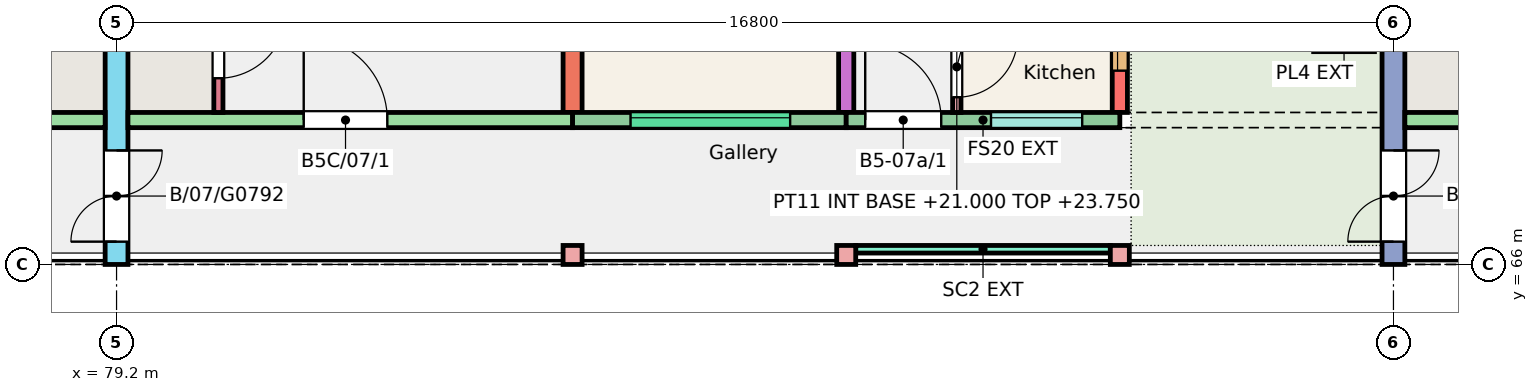
"""IFC4 building model, lengths in metres.
Left out: names, types, materials, properties, quantities, classifications, styles, units other than length and angle.
Written with IfcOpenShell. Run it as: python <this file> out.ifc"""

import sys

from ifc_helpers import new_model, si_unit, direction, frame, frame_2d, origin, origin_2d, place, context, subcontext, project, spatial, rectangle, extrude, element, fill, save


model = new_model("IFC4")
c1 = context("Model", 3, precision=1e-05, world=origin(), true_north=direction((0.0, 1.0)))
c2 = subcontext(c1, "Body", "Model", "MODEL_VIEW")
j1 = project(units=[si_unit("LENGTHUNIT", "METRE"), si_unit("PLANEANGLEUNIT", "RADIAN")], contexts=[c1])
p1 = place(None, origin())
s1 = spatial("IfcSite", under=j1, at=p1, CompositionType="ELEMENT")
p2 = place(p1, origin())
s2 = spatial("IfcBuilding", under=s1, at=p2, CompositionType="ELEMENT")
p3 = place(p2, frame((0.0, 0.0, 21.0)))
s3 = spatial("IfcBuildingStorey", under=s2, at=p3, CompositionType="ELEMENT", Elevation=21.0)
p4 = place(p3, frame((79.2, 66.0, 0.0), z_axis=(0.0, 0.0, 1.0), x_axis=(0.0, 1.0, 0.0)))
e1 = element("IfcWall", 1, at=p4, inside=s3, PredefinedType="SHEAR", context=c2, shape_type="SweptSolid", body=[
    extrude(rectangle(XDim=11.0, YDim=0.3, at=frame_2d((5.5, 0.0))), origin(), (0.0, 0.0, 1.0), 3.0),
])
p5 = place(p4, frame((0.3, 0.0, 0.0)))
e2 = element("IfcOpeningElement", 2, at=p5, cuts=e1, PredefinedType="OPENING", context=c2, shape_type="SweptSolid", body=[
    extrude(rectangle(XDim=1.2, YDim=2.1, at=frame_2d((0.6, 1.05))), frame((0.0, 0.16, 0.0), z_axis=(0.0, -1.0, 0.0), x_axis=(1.0, 0.0, 0.0)), (0.0, 0.0, 1.0), 0.32),
])
p6 = place(p3, frame((85.2, 68.0, 0.0), z_axis=(0.0, 0.0, 1.0), x_axis=(0.0, 1.0, 0.0)))
e3 = element("IfcWall", 3, at=p6, inside=s3, PredefinedType="SHEAR", context=c2, shape_type="SweptSolid", body=[
    extrude(rectangle(XDim=9.0, YDim=0.25, at=frame_2d((4.5, 0.0))), origin(), (0.0, 0.0, 1.0), 3.0),
])
p7 = place(p3, frame((88.8, 68.0, 0.0), z_axis=(0.0, 0.0, 1.0), x_axis=(0.0, 1.0, 0.0)))
e4 = element("IfcWall", 4, at=p7, inside=s3, PredefinedType="SHEAR", context=c2, shape_type="SweptSolid", body=[
    extrude(rectangle(XDim=9.0, YDim=0.2, at=frame_2d((4.5, 0.0))), origin(), (0.0, 0.0, 1.0), 3.0),
])
p8 = place(p7, frame((2.4, 0.0, 0.0)))
e5 = element("IfcOpeningElement", 5, at=p8, cuts=e4, PredefinedType="OPENING", context=c2, shape_type="SweptSolid", body=[
    extrude(rectangle(XDim=1.2, YDim=2.1, at=frame_2d((0.6, 1.05))), frame((0.0, 0.11, 0.0), z_axis=(0.0, -1.0, 0.0), x_axis=(1.0, 0.0, 0.0)), (0.0, 0.0, 1.0), 0.22),
])
p9 = place(p7, frame((6.4, 0.0, 0.0)))
e6 = element("IfcOpeningElement", 6, at=p9, cuts=e4, PredefinedType="OPENING", context=c2, shape_type="SweptSolid", body=[
    extrude(rectangle(XDim=1.2, YDim=2.1, at=frame_2d((0.6, 1.05))), frame((0.0, 0.11, 0.0), z_axis=(0.0, -1.0, 0.0), x_axis=(1.0, 0.0, 0.0)), (0.0, 0.0, 1.0), 0.22),
])
p10 = place(p3, frame((92.4, 68.0, 0.0), z_axis=(0.0, 0.0, 1.0), x_axis=(0.0, 1.0, 0.0)))
e7 = element("IfcWall", 7, at=p10, inside=s3, PredefinedType="SHEAR", context=c2, shape_type="SweptSolid", body=[
    extrude(rectangle(XDim=9.0, YDim=0.2, at=frame_2d((4.5, 0.0))), origin(), (0.0, 0.0, 1.0), 3.0),
])
p11 = place(p10, frame((0.55, 0.0, 0.9)))
e8 = element("IfcOpeningElement", 8, at=p11, cuts=e7, PredefinedType="OPENING", context=c2, shape_type="SweptSolid", body=[
    extrude(rectangle(XDim=1.2, YDim=1.5, at=frame_2d((0.6, 0.75))), frame((0.0, 0.11, 0.0), z_axis=(0.0, -1.0, 0.0), x_axis=(1.0, 0.0, 0.0)), (0.0, 0.0, 1.0), 0.22),
])
p12 = place(p10, frame((7.653, 0.0, 0.9)))
e9 = element("IfcOpeningElement", 9, at=p12, cuts=e7, PredefinedType="OPENING", context=c2, shape_type="SweptSolid", body=[
    extrude(rectangle(XDim=1.2, YDim=1.5, at=frame_2d((0.6, 0.75))), frame((0.0, 0.11, 0.0), z_axis=(0.0, -1.0, 0.0), x_axis=(1.0, 0.0, 0.0)), (0.0, 0.0, 1.0), 0.22),
])
p13 = place(p10, frame((6.405, 0.0, 0.0)))
e10 = element("IfcOpeningElement", 10, at=p13, cuts=e7, PredefinedType="OPENING", context=c2, shape_type="SweptSolid", body=[
    extrude(rectangle(XDim=1.0, YDim=2.1, at=frame_2d((0.5, 1.05))), frame((0.0, 0.11, 0.0), z_axis=(0.0, -1.0, 0.0), x_axis=(1.0, 0.0, 0.0)), (0.0, 0.0, 1.0), 0.22),
])
p14 = place(p3, frame((96.0, 66.0, 0.0), z_axis=(0.0, 0.0, 1.0), x_axis=(0.0, 1.0, 0.0)))
e11 = element("IfcWall", 11, at=p14, inside=s3, PredefinedType="SHEAR", context=c2, shape_type="SweptSolid", body=[
    extrude(rectangle(XDim=11.0, YDim=0.3, at=frame_2d((5.5, 0.0))), origin(), (0.0, 0.0, 1.0), 3.0),
])
p15 = place(p14, frame((0.3, 0.0, 0.0)))
e12 = element("IfcOpeningElement", 12, at=p15, cuts=e11, PredefinedType="OPENING", context=c2, shape_type="SweptSolid", body=[
    extrude(rectangle(XDim=1.2, YDim=2.1, at=frame_2d((0.6, 1.05))), frame((0.0, 0.16, 0.0), z_axis=(0.0, -1.0, 0.0), x_axis=(1.0, 0.0, 0.0)), (0.0, 0.0, 1.0), 0.32),
])
p16 = place(p3, frame((73.2, 67.9, 0.0), z_axis=(0.0, 0.0, 1.0), x_axis=(1.0, 0.0, 0.0)))
e13 = element("IfcWall", 13, at=p16, inside=s3, PredefinedType="SHEAR", context=c2, shape_type="SweptSolid", body=[
    extrude(rectangle(XDim=5.85, YDim=0.2, at=frame_2d((2.925, 0.0))), origin(), (0.0, 0.0, 1.0), 3.0),
])
p17 = place(p16, frame((2.438, 0.0, 0.0)))
e14 = element("IfcOpeningElement", 14, at=p17, cuts=e13, PredefinedType="OPENING", context=c2, shape_type="SweptSolid", body=[
    extrude(rectangle(XDim=1.1, YDim=2.1, at=frame_2d((0.55, 1.05))), frame((0.0, 0.11, 0.0), z_axis=(0.0, -1.0, 0.0), x_axis=(1.0, 0.0, 0.0)), (0.0, 0.0, 1.0), 0.22),
])
p18 = place(p3, frame((79.35, 67.9, 0.0), z_axis=(0.0, 0.0, 1.0), x_axis=(1.0, 0.0, 0.0)))
e15 = element("IfcWall", 15, at=p18, inside=s3, PredefinedType="SHEAR", context=c2, shape_type="SweptSolid", body=[
    extrude(rectangle(XDim=5.85, YDim=0.2, at=frame_2d((2.925, 0.0))), origin(), (0.0, 0.0, 1.0), 3.0),
])
p19 = place(p18, frame((2.312, 0.0, 0.0)))
e16 = element("IfcOpeningElement", 16, at=p19, cuts=e15, PredefinedType="OPENING", context=c2, shape_type="SweptSolid", body=[
    extrude(rectangle(XDim=1.1, YDim=2.1, at=frame_2d((0.55, 1.05))), frame((0.0, 0.11, 0.0), z_axis=(0.0, -1.0, 0.0), x_axis=(1.0, 0.0, 0.0)), (0.0, 0.0, 1.0), 0.22),
])
p20 = place(p3, frame((80.54, 68.0, 0.0), z_axis=(0.0, 0.0, 1.0), x_axis=(0.0, 1.0, 0.0)))
e17 = element("IfcWall", 17, at=p20, inside=s3, PredefinedType="SHEAR", context=c2, shape_type="SweptSolid", body=[
    extrude(rectangle(XDim=1.72, YDim=0.12, at=frame_2d((0.86, 0.0))), origin(), (0.0, 0.0, 1.0), 3.0),
])
p21 = place(p20, frame((0.45, 0.0, 0.0)))
e18 = element("IfcOpeningElement", 18, at=p21, cuts=e17, PredefinedType="OPENING", context=c2, shape_type="SweptSolid", body=[
    extrude(rectangle(XDim=0.9, YDim=2.1, at=frame_2d((0.45, 1.05))), frame((0.0, 0.07, 0.0), z_axis=(0.0, -1.0, 0.0), x_axis=(1.0, 0.0, 0.0)), (0.0, 0.0, 1.0), 0.14),
])
p22 = place(p3, frame((85.2, 67.9, 0.0), z_axis=(0.0, 0.0, 1.0), x_axis=(1.0, 0.0, 0.0)))
e19 = element("IfcWall", 19, at=p22, inside=s3, PredefinedType="SOLIDWALL", context=c2, shape_type="SweptSolid", body=[
    extrude(rectangle(XDim=3.6, YDim=0.2, at=frame_2d((1.8, 0.0))), origin(), (0.0, 0.0, 1.0), 3.0),
])
p23 = place(p22, frame((0.762, 0.0, 1.2)))
e20 = element("IfcOpeningElement", 20, at=p23, cuts=e19, PredefinedType="OPENING", context=c2, shape_type="SweptSolid", body=[
    extrude(rectangle(XDim=2.1, YDim=1.2, at=frame_2d((1.05, 0.6))), frame((0.0, 0.11, 0.0), z_axis=(0.0, -1.0, 0.0), x_axis=(1.0, 0.0, 0.0)), (0.0, 0.0, 1.0), 0.22),
])
p24 = place(p3, frame((88.8, 67.9, 0.0), z_axis=(0.0, 0.0, 1.0), x_axis=(1.0, 0.0, 0.0)))
e21 = element("IfcWall", 21, at=p24, inside=s3, PredefinedType="SOLIDWALL", context=c2, shape_type="SweptSolid", body=[
    extrude(rectangle(XDim=3.6, YDim=0.2, at=frame_2d((1.8, 0.0))), origin(), (0.0, 0.0, 1.0), 3.0),
])
p25 = place(p24, frame((1.905, 0.0, 1.1)))
e22 = element("IfcOpeningElement", 22, at=p25, cuts=e21, PredefinedType="OPENING", context=c2, shape_type="SweptSolid", body=[
    extrude(rectangle(XDim=1.2, YDim=1.3, at=frame_2d((0.6, 0.65))), frame((0.0, 0.11, 0.0), z_axis=(0.0, -1.0, 0.0), x_axis=(1.0, 0.0, 0.0)), (0.0, 0.0, 1.0), 0.22),
])
p26 = place(p24, frame((0.25, 0.0, 0.0)))
e23 = element("IfcOpeningElement", 23, at=p26, cuts=e21, PredefinedType="OPENING", context=c2, shape_type="SweptSolid", body=[
    extrude(rectangle(XDim=1.0, YDim=2.1, at=frame_2d((0.5, 1.05))), frame((0.0, 0.11, 0.0), z_axis=(0.0, -1.0, 0.0), x_axis=(1.0, 0.0, 0.0)), (0.0, 0.0, 1.0), 0.22),
])
p27 = place(p3, frame((96.15, 67.9, 0.0), z_axis=(0.0, 0.0, 1.0), x_axis=(1.0, 0.0, 0.0)))
e24 = element("IfcWall", 24, at=p27, inside=s3, PredefinedType="SHEAR", context=c2, shape_type="SweptSolid", body=[
    extrude(rectangle(XDim=5.85, YDim=0.2, at=frame_2d((2.925, 0.0))), origin(), (0.0, 0.0, 1.0), 3.0),
])
p28 = place(p27, frame((2.312, 0.0, 0.0)))
e25 = element("IfcOpeningElement", 25, at=p28, cuts=e24, PredefinedType="OPENING", context=c2, shape_type="SweptSolid", body=[
    extrude(rectangle(XDim=1.1, YDim=2.1, at=frame_2d((0.55, 1.05))), frame((0.0, 0.11, 0.0), z_axis=(0.0, -1.0, 0.0), x_axis=(1.0, 0.0, 0.0)), (0.0, 0.0, 1.0), 0.22),
])
for number, where, z_axis, x_axis in (
    (26, (85.2, 66.125, 0.0), (0.0, 0.0, 1.0), (1.0, 0.0, 0.0)),
    (27, (88.8, 66.125, 0.0), (0.0, 0.0, 1.0), (1.0, 0.0, 0.0)),
    (28, (92.4, 66.125, 0.0), (0.0, 0.0, 1.0), (1.0, 0.0, 0.0)),
):
    element("IfcColumn", number, at=place(p3, frame(where, z_axis=z_axis, x_axis=x_axis)), inside=s3, PredefinedType="COLUMN", context=c2, shape_type="SweptSolid", body=[
        extrude(rectangle(XDim=0.25, YDim=0.25, at=origin_2d()), origin(), (0.0, 0.0, 1.0), 3.0),
    ])
p29 = place(p3, frame((94.95, 68.9, 0.01), z_axis=(0.0, 0.0, 1.0), x_axis=(1.0, 0.0, 0.0)))
e29 = element("IfcWall", 29, at=p29, inside=s3, PredefinedType="SOLIDWALL", context=c2, shape_type="SweptSolid", body=[
    extrude(rectangle(XDim=0.8, YDim=0.2, at=frame_2d((0.4, 0.0))), origin(), (0.0, 0.0, 1.0), 0.45),
])
p30 = place(p3, frame((88.925, 66.2, 0.0), z_axis=(0.0, 0.0, 1.0), x_axis=(1.0, 0.0, 0.0)))
e30 = element("IfcWall", 30, at=p30, inside=s3, PredefinedType="SOLIDWALL", context=c2, shape_type="SweptSolid", body=[
    extrude(rectangle(XDim=3.35, YDim=0.1, at=frame_2d((1.675, 0.0))), origin(), (0.0, 0.0, 1.0), 2.45),
])
p31 = place(p3, frame((90.255, 68.0, 0.0), z_axis=(0.0, 0.0, 1.0), x_axis=(0.0, 1.0, 0.0)))
e31 = element("IfcWall", 31, at=p31, inside=s3, PredefinedType="PARTITIONING", context=c2, shape_type="SweptSolid", body=[
    extrude(rectangle(XDim=4.7, YDim=0.11, at=frame_2d((2.35, 0.0))), origin(), (0.0, 0.0, 1.0), 2.75),
])
p32 = place(p31, frame((0.2, 0.0, 0.0)))
e32 = element("IfcOpeningElement", 32, at=p32, cuts=e31, PredefinedType="OPENING", context=c2, shape_type="SweptSolid", body=[
    extrude(rectangle(XDim=0.8, YDim=2.1, at=frame_2d((0.4, 1.05))), frame((0.0, 0.065, 0.0), z_axis=(0.0, -1.0, 0.0), x_axis=(1.0, 0.0, 0.0)), (0.0, 0.0, 1.0), 0.13),
])
p33 = place(p31, frame((3.75, 0.0, 0.0)))
e33 = element("IfcOpeningElement", 33, at=p33, cuts=e31, PredefinedType="OPENING", context=c2, shape_type="SweptSolid", body=[
    extrude(rectangle(XDim=0.8, YDim=2.1, at=frame_2d((0.4, 1.05))), frame((0.0, 0.065, 0.0), z_axis=(0.0, -1.0, 0.0), x_axis=(1.0, 0.0, 0.0)), (0.0, 0.0, 1.0), 0.13),
])
p34 = place(p23, origin())
e34 = element("IfcWindow", 34, at=p34, inside=s3, PartitioningType="SINGLE_PANEL", PredefinedType="WINDOW", context=c2, shape_type="SweptSolid", body=[
    extrude(rectangle(XDim=2.1, YDim=1.2, at=frame_2d((1.05, 0.6))), frame((0.0, 0.06, 0.0), z_axis=(0.0, -1.0, 0.0), x_axis=(1.0, 0.0, 0.0)), (0.0, 0.0, 1.0), 0.06),
])
fill(e20, e34)
p35 = place(p25, origin())
e35 = element("IfcWindow", 35, at=p35, inside=s3, PartitioningType="SINGLE_PANEL", PredefinedType="WINDOW", context=c2, shape_type="SweptSolid", body=[
    extrude(rectangle(XDim=1.2, YDim=1.3, at=frame_2d((0.6, 0.65))), frame((0.0, 0.06, 0.0), z_axis=(0.0, -1.0, 0.0), x_axis=(1.0, 0.0, 0.0)), (0.0, 0.0, 1.0), 0.06),
])
fill(e22, e35)
p36 = place(p11, origin())
e36 = element("IfcWindow", 36, at=p36, inside=s3, PartitioningType="SINGLE_PANEL", PredefinedType="WINDOW", context=c2, shape_type="SweptSolid", body=[
    extrude(rectangle(XDim=1.2, YDim=1.5, at=frame_2d((0.6, 0.75))), frame((0.0, 0.06, 0.0), z_axis=(0.0, -1.0, 0.0), x_axis=(1.0, 0.0, 0.0)), (0.0, 0.0, 1.0), 0.06),
])
fill(e8, e36)
p37 = place(p26, origin())
e37 = element("IfcDoor", 37, at=p37, inside=s3, OperationType="SINGLE_SWING_LEFT", PredefinedType="DOOR", context=c2, shape_type="SweptSolid", body=[
    extrude(rectangle(XDim=1.0, YDim=2.1, at=frame_2d((0.5, 1.05))), frame((0.0, 0.025, 0.0), z_axis=(0.0, -1.0, 0.0), x_axis=(1.0, 0.0, 0.0)), (0.0, 0.0, 1.0), 0.05),
])
fill(e23, e37)
p38 = place(p32, origin())
e38 = element("IfcDoor", 38, at=p38, inside=s3, OperationType="SINGLE_SWING_RIGHT", PredefinedType="DOOR", context=c2, shape_type="SweptSolid", body=[
    extrude(rectangle(XDim=0.8, YDim=2.1, at=frame_2d((0.4, 1.05))), frame((0.0, 0.025, 0.0), z_axis=(0.0, -1.0, 0.0), x_axis=(1.0, 0.0, 0.0)), (0.0, 0.0, 1.0), 0.05),
])
fill(e32, e38)
p39 = place(p19, origin())
e39 = element("IfcDoor", 39, at=p39, inside=s3, OperationType="SINGLE_SWING_LEFT", PredefinedType="DOOR", context=c2, shape_type="SweptSolid", body=[
    extrude(rectangle(XDim=1.1, YDim=2.1, at=frame_2d((0.55, 1.05))), frame((0.0, 0.025, 0.0), z_axis=(0.0, -1.0, 0.0), x_axis=(1.0, 0.0, 0.0)), (0.0, 0.0, 1.0), 0.05),
])
fill(e16, e39)
p40 = place(p21, origin())
e40 = element("IfcDoor", 40, at=p40, inside=s3, OperationType="SINGLE_SWING_RIGHT", PredefinedType="DOOR", context=c2, shape_type="SweptSolid", body=[
    extrude(rectangle(XDim=0.9, YDim=2.1, at=frame_2d((0.45, 1.05))), frame((0.0, 0.025, 0.0), z_axis=(0.0, -1.0, 0.0), x_axis=(1.0, 0.0, 0.0)), (0.0, 0.0, 1.0), 0.05),
])
fill(e18, e40)
p41 = place(p5, origin())
e41 = element("IfcDoor", 41, at=p41, inside=s3, OperationType="DOUBLE_DOOR_SINGLE_SWING", PredefinedType="DOOR", context=c2, shape_type="SweptSolid", body=[
    extrude(rectangle(XDim=1.2, YDim=2.1, at=frame_2d((0.6, 1.05))), frame((0.0, 0.025, 0.0), z_axis=(0.0, -1.0, 0.0), x_axis=(1.0, 0.0, 0.0)), (0.0, 0.0, 1.0), 0.05),
])
fill(e2, e41)
p42 = place(p15, origin())
e42 = element("IfcDoor", 42, at=p42, inside=s3, OperationType="DOUBLE_DOOR_SINGLE_SWING", PredefinedType="DOOR", context=c2, shape_type="SweptSolid", body=[
    extrude(rectangle(XDim=1.2, YDim=2.1, at=frame_2d((0.6, 1.05))), frame((0.0, 0.025, 0.0), z_axis=(0.0, -1.0, 0.0), x_axis=(1.0, 0.0, 0.0)), (0.0, 0.0, 1.0), 0.05),
])
fill(e12, e42)
save(model, sys.argv[1])
